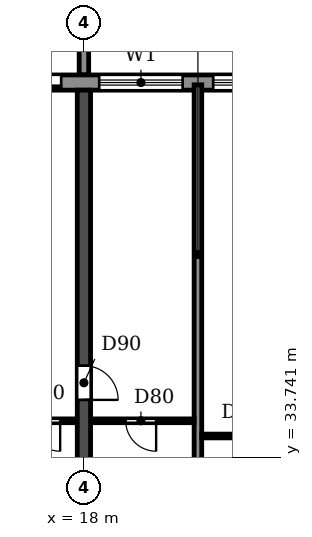
"""IFC4 building model, lengths in metres.
Left out: names, types, materials, properties, quantities, classifications, styles, units other than length and angle.
Written with IfcOpenShell. Run it as: python <this file> out.ifc"""

import sys

from ifc_helpers import new_model, si_unit, direction, frame, frame_2d, origin, place, context, subcontext, project, spatial, polyline, rectangle, outline, extrude, source, transform, mapped, element, fill, save


model = new_model("IFC4")
c1 = context("Model", 3, precision=1e-05, world=origin(), true_north=direction((0.0, 1.0)))
c2 = subcontext(c1, "Body", "Model", "MODEL_VIEW")
j1 = project(units=[si_unit("LENGTHUNIT", "METRE"), si_unit("PLANEANGLEUNIT", "RADIAN")], contexts=[c1])
p1 = place(None, origin())
s1 = spatial("IfcSite", under=j1, at=p1, CompositionType="ELEMENT")
p2 = place(p1, origin())
s2 = spatial("IfcBuilding", under=s1, at=p2, CompositionType="ELEMENT")
p3 = place(p2, frame((0.0, 0.0, 82.8)))
s3 = spatial("IfcBuildingStorey", under=s2, at=p3, CompositionType="ELEMENT", Elevation=82.8)
p4 = place(p3, frame((18.0, 30.525, 0.0), z_axis=(0.0, 0.0, 1.0), x_axis=(0.0, 1.0, 0.0)))
e1 = element("IfcWall", 1, at=p4, inside=s3, PredefinedType="SHEAR", context=c2, shape_type="SweptSolid", body=[
    extrude(rectangle(XDim=12.875, YDim=0.35, at=frame_2d((6.438, 0.0))), origin(), (0.0, 0.0, 1.0), 3.06),
])
p5 = place(p4, frame((4.725, 0.0, 0.0)))
e2 = element("IfcOpeningElement", 2, at=p5, cuts=e1, PredefinedType="OPENING", context=c2, shape_type="SweptSolid", body=[
    extrude(rectangle(XDim=0.9, YDim=2.1, at=frame_2d((0.45, 1.05))), frame((0.0, 0.185, 0.0), z_axis=(0.0, -1.0, 0.0), x_axis=(1.0, 0.0, 0.0)), (0.0, 0.0, 1.0), 0.37),
])
p6 = place(p3, frame((91.317, 43.6, 0.0), z_axis=(0.0, 0.0, 1.0), x_axis=(-1.0, 0.0, 0.0)))
e3 = element("IfcWall", 3, at=p6, inside=s3, PredefinedType="STANDARD", context=c2, shape_type="SweptSolid", body=[
    extrude(rectangle(XDim=80.634, YDim=0.4, at=frame_2d((40.317, 0.0))), origin(), (0.0, 0.0, 1.0), 3.06),
])
p7 = place(p6, frame((76.717, 0.0, 0.9)))
e4 = element("IfcOpeningElement", 4, at=p7, cuts=e3, PredefinedType="OPENING", context=c2, shape_type="SweptSolid", body=[
    extrude(rectangle(XDim=2.2, YDim=1.5, at=frame_2d((1.1, 0.75))), frame((0.0, 0.21, 0.0), z_axis=(0.0, -1.0, 0.0), x_axis=(1.0, 0.0, 0.0)), (0.0, 0.0, 1.0), 0.42),
])
p8 = place(p6, frame((73.917, 0.0, 0.0)))
e5 = element("IfcOpeningElement", 5, at=p8, cuts=e3, PredefinedType="OPENING", context=c2, shape_type="SweptSolid", body=[
    extrude(rectangle(XDim=1.8, YDim=2.4, at=frame_2d((0.9, 1.2))), frame((0.0, 0.21, 0.0), z_axis=(0.0, -1.0, 0.0), x_axis=(1.0, 0.0, 0.0)), (0.0, 0.0, 1.0), 0.42),
])
p9 = place(p6, frame((70.717, 0.0, 0.9)))
e6 = element("IfcOpeningElement", 6, at=p9, cuts=e3, PredefinedType="OPENING", context=c2, shape_type="SweptSolid", body=[
    extrude(rectangle(XDim=2.2, YDim=1.5, at=frame_2d((1.1, 0.75))), frame((0.0, 0.21, 0.0), z_axis=(0.0, -1.0, 0.0), x_axis=(1.0, 0.0, 0.0)), (0.0, 0.0, 1.0), 0.42),
])
p10 = place(p6, frame((67.717, 0.0, 0.9)))
e7 = element("IfcOpeningElement", 7, at=p10, cuts=e3, PredefinedType="OPENING", context=c2, shape_type="SweptSolid", body=[
    extrude(rectangle(XDim=2.2, YDim=1.5, at=frame_2d((1.1, 0.75))), frame((0.0, 0.21, 0.0), z_axis=(0.0, -1.0, 0.0), x_axis=(1.0, 0.0, 0.0)), (0.0, 0.0, 1.0), 0.42),
])
p11 = place(p6, frame((64.717, 0.0, 0.9)))
e8 = element("IfcOpeningElement", 8, at=p11, cuts=e3, PredefinedType="OPENING", context=c2, shape_type="SweptSolid", body=[
    extrude(rectangle(XDim=2.2, YDim=1.5, at=frame_2d((1.1, 0.75))), frame((0.0, 0.21, 0.0), z_axis=(0.0, -1.0, 0.0), x_axis=(1.0, 0.0, 0.0)), (0.0, 0.0, 1.0), 0.42),
])
p12 = place(p6, frame((61.917, 0.0, 0.0)))
e9 = element("IfcOpeningElement", 9, at=p12, cuts=e3, PredefinedType="OPENING", context=c2, shape_type="SweptSolid", body=[
    extrude(rectangle(XDim=1.8, YDim=2.4, at=frame_2d((0.9, 1.2))), frame((0.0, 0.21, 0.0), z_axis=(0.0, -1.0, 0.0), x_axis=(1.0, 0.0, 0.0)), (0.0, 0.0, 1.0), 0.42),
])
p13 = place(p6, frame((58.917, 0.0, 0.0)))
e10 = element("IfcOpeningElement", 10, at=p13, cuts=e3, PredefinedType="OPENING", context=c2, shape_type="SweptSolid", body=[
    extrude(rectangle(XDim=1.8, YDim=2.4, at=frame_2d((0.9, 1.2))), frame((0.0, 0.21, 0.0), z_axis=(0.0, -1.0, 0.0), x_axis=(1.0, 0.0, 0.0)), (0.0, 0.0, 1.0), 0.42),
])
p14 = place(p6, frame((55.717, 0.0, 0.9)))
e11 = element("IfcOpeningElement", 11, at=p14, cuts=e3, PredefinedType="OPENING", context=c2, shape_type="SweptSolid", body=[
    extrude(rectangle(XDim=2.2, YDim=1.5, at=frame_2d((1.1, 0.75))), frame((0.0, 0.21, 0.0), z_axis=(0.0, -1.0, 0.0), x_axis=(1.0, 0.0, 0.0)), (0.0, 0.0, 1.0), 0.42),
])
p15 = place(p6, frame((52.717, 0.0, 0.9)))
e12 = element("IfcOpeningElement", 12, at=p15, cuts=e3, PredefinedType="OPENING", context=c2, shape_type="SweptSolid", body=[
    extrude(rectangle(XDim=2.2, YDim=1.5, at=frame_2d((1.1, 0.75))), frame((0.0, 0.21, 0.0), z_axis=(0.0, -1.0, 0.0), x_axis=(1.0, 0.0, 0.0)), (0.0, 0.0, 1.0), 0.42),
])
p16 = place(p6, frame((49.917, 0.0, 0.0)))
e13 = element("IfcOpeningElement", 13, at=p16, cuts=e3, PredefinedType="OPENING", context=c2, shape_type="SweptSolid", body=[
    extrude(rectangle(XDim=1.8, YDim=2.4, at=frame_2d((0.9, 1.2))), frame((0.0, 0.21, 0.0), z_axis=(0.0, -1.0, 0.0), x_axis=(1.0, 0.0, 0.0)), (0.0, 0.0, 1.0), 0.42),
])
p17 = place(p6, frame((46.717, 0.0, 0.9)))
e14 = element("IfcOpeningElement", 14, at=p17, cuts=e3, PredefinedType="OPENING", context=c2, shape_type="SweptSolid", body=[
    extrude(rectangle(XDim=2.2, YDim=1.5, at=frame_2d((1.1, 0.75))), frame((0.0, 0.21, 0.0), z_axis=(0.0, -1.0, 0.0), x_axis=(1.0, 0.0, 0.0)), (0.0, 0.0, 1.0), 0.42),
])
p18 = place(p6, frame((43.717, 0.0, 0.9)))
e15 = element("IfcOpeningElement", 15, at=p18, cuts=e3, PredefinedType="OPENING", context=c2, shape_type="SweptSolid", body=[
    extrude(rectangle(XDim=2.2, YDim=1.5, at=frame_2d((1.1, 0.75))), frame((0.0, 0.21, 0.0), z_axis=(0.0, -1.0, 0.0), x_axis=(1.0, 0.0, 0.0)), (0.0, 0.0, 1.0), 0.42),
])
p19 = place(p6, frame((40.717, 0.0, 0.9)))
e16 = element("IfcOpeningElement", 16, at=p19, cuts=e3, PredefinedType="OPENING", context=c2, shape_type="SweptSolid", body=[
    extrude(rectangle(XDim=2.2, YDim=1.5, at=frame_2d((1.1, 0.75))), frame((0.0, 0.21, 0.0), z_axis=(0.0, -1.0, 0.0), x_axis=(1.0, 0.0, 0.0)), (0.0, 0.0, 1.0), 0.42),
])
p20 = place(p6, frame((37.917, 0.0, 0.0)))
e17 = element("IfcOpeningElement", 17, at=p20, cuts=e3, PredefinedType="OPENING", context=c2, shape_type="SweptSolid", body=[
    extrude(rectangle(XDim=1.8, YDim=2.4, at=frame_2d((0.9, 1.2))), frame((0.0, 0.21, 0.0), z_axis=(0.0, -1.0, 0.0), x_axis=(1.0, 0.0, 0.0)), (0.0, 0.0, 1.0), 0.42),
])
p21 = place(p6, frame((34.717, 0.0, 0.9)))
e18 = element("IfcOpeningElement", 18, at=p21, cuts=e3, PredefinedType="OPENING", context=c2, shape_type="SweptSolid", body=[
    extrude(rectangle(XDim=2.2, YDim=1.5, at=frame_2d((1.1, 0.75))), frame((0.0, 0.21, 0.0), z_axis=(0.0, -1.0, 0.0), x_axis=(1.0, 0.0, 0.0)), (0.0, 0.0, 1.0), 0.42),
])
p22 = place(p6, frame((31.717, 0.0, 0.9)))
e19 = element("IfcOpeningElement", 19, at=p22, cuts=e3, PredefinedType="OPENING", context=c2, shape_type="SweptSolid", body=[
    extrude(rectangle(XDim=2.2, YDim=1.5, at=frame_2d((1.1, 0.75))), frame((0.0, 0.21, 0.0), z_axis=(0.0, -1.0, 0.0), x_axis=(1.0, 0.0, 0.0)), (0.0, 0.0, 1.0), 0.42),
])
p23 = place(p6, frame((28.917, 0.0, 0.0)))
e20 = element("IfcOpeningElement", 20, at=p23, cuts=e3, PredefinedType="OPENING", context=c2, shape_type="SweptSolid", body=[
    extrude(rectangle(XDim=1.8, YDim=2.4, at=frame_2d((0.9, 1.2))), frame((0.0, 0.21, 0.0), z_axis=(0.0, -1.0, 0.0), x_axis=(1.0, 0.0, 0.0)), (0.0, 0.0, 1.0), 0.42),
])
p24 = place(p6, frame((25.717, 0.0, 0.9)))
e21 = element("IfcOpeningElement", 21, at=p24, cuts=e3, PredefinedType="OPENING", context=c2, shape_type="SweptSolid", body=[
    extrude(rectangle(XDim=2.2, YDim=1.5, at=frame_2d((1.1, 0.75))), frame((0.0, 0.21, 0.0), z_axis=(0.0, -1.0, 0.0), x_axis=(1.0, 0.0, 0.0)), (0.0, 0.0, 1.0), 0.42),
])
p25 = place(p6, frame((22.717, 0.0, 0.9)))
e22 = element("IfcOpeningElement", 22, at=p25, cuts=e3, PredefinedType="OPENING", context=c2, shape_type="SweptSolid", body=[
    extrude(rectangle(XDim=2.2, YDim=1.5, at=frame_2d((1.1, 0.75))), frame((0.0, 0.21, 0.0), z_axis=(0.0, -1.0, 0.0), x_axis=(1.0, 0.0, 0.0)), (0.0, 0.0, 1.0), 0.42),
])
p26 = place(p6, frame((19.717, 0.0, 0.9)))
e23 = element("IfcOpeningElement", 23, at=p26, cuts=e3, PredefinedType="OPENING", context=c2, shape_type="SweptSolid", body=[
    extrude(rectangle(XDim=2.2, YDim=1.5, at=frame_2d((1.1, 0.75))), frame((0.0, 0.21, 0.0), z_axis=(0.0, -1.0, 0.0), x_axis=(1.0, 0.0, 0.0)), (0.0, 0.0, 1.0), 0.42),
])
p27 = place(p6, frame((16.717, 0.0, 0.9)))
e24 = element("IfcOpeningElement", 24, at=p27, cuts=e3, PredefinedType="OPENING", context=c2, shape_type="SweptSolid", body=[
    extrude(rectangle(XDim=2.2, YDim=1.5, at=frame_2d((1.1, 0.75))), frame((0.0, 0.21, 0.0), z_axis=(0.0, -1.0, 0.0), x_axis=(1.0, 0.0, 0.0)), (0.0, 0.0, 1.0), 0.42),
])
p28 = place(p6, frame((13.917, 0.0, 0.0)))
e25 = element("IfcOpeningElement", 25, at=p28, cuts=e3, PredefinedType="OPENING", context=c2, shape_type="SweptSolid", body=[
    extrude(rectangle(XDim=1.8, YDim=2.4, at=frame_2d((0.9, 1.2))), frame((0.0, 0.21, 0.0), z_axis=(0.0, -1.0, 0.0), x_axis=(1.0, 0.0, 0.0)), (0.0, 0.0, 1.0), 0.42),
])
p29 = place(p6, frame((10.717, 0.0, 0.9)))
e26 = element("IfcOpeningElement", 26, at=p29, cuts=e3, PredefinedType="OPENING", context=c2, shape_type="SweptSolid", body=[
    extrude(rectangle(XDim=2.2, YDim=1.5, at=frame_2d((1.1, 0.75))), frame((0.0, 0.21, 0.0), z_axis=(0.0, -1.0, 0.0), x_axis=(1.0, 0.0, 0.0)), (0.0, 0.0, 1.0), 0.42),
])
p30 = place(p6, frame((7.717, 0.0, 0.9)))
e27 = element("IfcOpeningElement", 27, at=p30, cuts=e3, PredefinedType="OPENING", context=c2, shape_type="SweptSolid", body=[
    extrude(rectangle(XDim=2.2, YDim=1.5, at=frame_2d((1.1, 0.75))), frame((0.0, 0.21, 0.0), z_axis=(0.0, -1.0, 0.0), x_axis=(1.0, 0.0, 0.0)), (0.0, 0.0, 1.0), 0.42),
])
p31 = place(p6, frame((4.917, 0.0, 0.0)))
e28 = element("IfcOpeningElement", 28, at=p31, cuts=e3, PredefinedType="OPENING", context=c2, shape_type="SweptSolid", body=[
    extrude(rectangle(XDim=1.8, YDim=2.4, at=frame_2d((0.9, 1.2))), frame((0.0, 0.21, 0.0), z_axis=(0.0, -1.0, 0.0), x_axis=(1.0, 0.0, 0.0)), (0.0, 0.0, 1.0), 0.42),
])
p32 = place(p6, frame((1.717, 0.0, 0.9)))
e29 = element("IfcOpeningElement", 29, at=p32, cuts=e3, PredefinedType="OPENING", context=c2, shape_type="SweptSolid", body=[
    extrude(rectangle(XDim=2.2, YDim=1.5, at=frame_2d((1.1, 0.75))), frame((0.0, 0.21, 0.0), z_axis=(0.0, -1.0, 0.0), x_axis=(1.0, 0.0, 0.0)), (0.0, 0.0, 1.0), 0.42),
])
m1 = source(origin(), c2, "Body", "SweptSolid", [
    extrude(outline(polyline([(0.0, 0.0), (0.25, 0.0), (0.25, 3.1), (0.0, 3.1), (0.0, 0.0)])), origin(), (0.0, 0.0, 1.0), 3.1),
])
p33 = place(p3, frame((17.875, 43.8, 0.0)))
e30 = element("IfcWall", 30, at=p33, inside=s3, PredefinedType="STANDARD", context=c2, shape_type="MappedRepresentation", body=[
    mapped(m1, transform((0.0, 0.0, 0.0))),
])
p34 = place(p3, frame((21.0, 30.535, 0.0), z_axis=(0.0, 0.0, 1.0), x_axis=(0.0, 1.0, 0.0)))
e31 = element("IfcWall", 31, at=p34, inside=s3, PredefinedType="PARTITIONING", context=c2, shape_type="SweptSolid", body=[
    extrude(rectangle(XDim=13.005, YDim=0.2, at=frame_2d((6.502, 0.0))), origin(), (0.0, 0.0, 1.0), 3.06),
])
p35 = place(p3, frame((21.1, 34.3, 0.0), z_axis=(0.0, 0.0, 1.0), x_axis=(1.0, 0.0, 0.0)))
e32 = element("IfcWall", 32, at=p35, inside=s3, PredefinedType="PARTITIONING", context=c2, shape_type="SweptSolid", body=[
    extrude(rectangle(XDim=2.715, YDim=0.1, at=frame_2d((1.357, 0.0))), origin(), (0.0, 0.0, 1.0), 3.06),
])
p36 = place(p35, frame((1.0, 0.0, 0.0)))
e33 = element("IfcOpeningElement", 33, at=p36, cuts=e32, PredefinedType="OPENING", context=c2, shape_type="SweptSolid", body=[
    extrude(rectangle(XDim=0.8, YDim=2.1, at=frame_2d((0.4, 1.05))), frame((0.0, 0.06, 0.0), z_axis=(0.0, -1.0, 0.0), x_axis=(1.0, 0.0, 0.0)), (0.0, 0.0, 1.0), 0.12),
])
p37 = place(p3, frame((15.9, 34.7, 0.0), z_axis=(0.0, 0.0, 1.0), x_axis=(1.0, 0.0, 0.0)))
e34 = element("IfcWall", 34, at=p37, inside=s3, PredefinedType="PARTITIONING", context=c2, shape_type="SweptSolid", body=[
    extrude(rectangle(XDim=1.915, YDim=0.1, at=frame_2d((0.958, 0.0))), origin(), (0.0, 0.0, 1.0), 3.06),
])
p38 = place(p37, frame((0.675, 0.0, 0.0)))
e35 = element("IfcOpeningElement", 35, at=p38, cuts=e34, PredefinedType="OPENING", context=c2, shape_type="SweptSolid", body=[
    extrude(rectangle(XDim=0.8, YDim=2.1, at=frame_2d((0.4, 1.05))), frame((0.0, 0.06, 0.0), z_axis=(0.0, -1.0, 0.0), x_axis=(1.0, 0.0, 0.0)), (0.0, 0.0, 1.0), 0.12),
])
p39 = place(p3, frame((18.185, 34.7, 0.0), z_axis=(0.0, 0.0, 1.0), x_axis=(1.0, 0.0, 0.0)))
e36 = element("IfcWall", 36, at=p39, inside=s3, PredefinedType="PARTITIONING", context=c2, shape_type="SweptSolid", body=[
    extrude(rectangle(XDim=2.715, YDim=0.1, at=frame_2d((1.357, 0.0))), origin(), (0.0, 0.0, 1.0), 3.06),
])
p40 = place(p39, frame((0.915, 0.0, 0.0)))
e37 = element("IfcOpeningElement", 37, at=p40, cuts=e36, PredefinedType="OPENING", context=c2, shape_type="SweptSolid", body=[
    extrude(rectangle(XDim=0.8, YDim=2.1, at=frame_2d((0.4, 1.05))), frame((0.0, 0.06, 0.0), z_axis=(0.0, -1.0, 0.0), x_axis=(1.0, 0.0, 0.0)), (0.0, 0.0, 1.0), 0.12),
])
p41 = place(p8, origin())
e38 = element("IfcDoor", 38, at=p41, inside=s3, OperationType="DOUBLE_DOOR_SLIDING", PredefinedType="DOOR", context=c2, shape_type="SweptSolid", body=[
    extrude(rectangle(XDim=1.8, YDim=2.4, at=frame_2d((0.9, 1.2))), frame((0.0, 0.025, 0.0), z_axis=(0.0, -1.0, 0.0), x_axis=(1.0, 0.0, 0.0)), (0.0, 0.0, 1.0), 0.05),
])
fill(e5, e38)
p42 = place(p9, origin())
e39 = element("IfcWindow", 39, at=p42, inside=s3, PartitioningType="DOUBLE_PANEL_HORIZONTAL", PredefinedType="WINDOW", context=c2, shape_type="SweptSolid", body=[
    extrude(rectangle(XDim=2.2, YDim=1.5, at=frame_2d((1.1, 0.75))), frame((0.0, 0.03, 0.0), z_axis=(0.0, -1.0, 0.0), x_axis=(1.0, 0.0, 0.0)), (0.0, 0.0, 1.0), 0.06),
])
fill(e6, e39)
p43 = place(p10, origin())
e40 = element("IfcWindow", 40, at=p43, inside=s3, PartitioningType="DOUBLE_PANEL_HORIZONTAL", PredefinedType="WINDOW", context=c2, shape_type="SweptSolid", body=[
    extrude(rectangle(XDim=2.2, YDim=1.5, at=frame_2d((1.1, 0.75))), frame((0.0, 0.03, 0.0), z_axis=(0.0, -1.0, 0.0), x_axis=(1.0, 0.0, 0.0)), (0.0, 0.0, 1.0), 0.06),
])
fill(e7, e40)
p44 = place(p40, frame((0.8, 0.0, 0.0), z_axis=(0.0, 0.0, 1.0), x_axis=(-1.0, 0.0, 0.0)))
e41 = element("IfcDoor", 41, at=p44, inside=s3, OperationType="SINGLE_SWING_LEFT", PredefinedType="DOOR", context=c2, shape_type="SweptSolid", body=[
    extrude(rectangle(XDim=0.8, YDim=2.1, at=frame_2d((0.4, 1.05))), frame((0.0, 0.025, 0.0), z_axis=(0.0, -1.0, 0.0), x_axis=(1.0, 0.0, 0.0)), (0.0, 0.0, 1.0), 0.05),
])
fill(e37, e41)
p45 = place(p38, frame((0.8, 0.0, 0.0), z_axis=(0.0, 0.0, 1.0), x_axis=(-1.0, 0.0, 0.0)))
e42 = element("IfcDoor", 42, at=p45, inside=s3, OperationType="SINGLE_SWING_LEFT", PredefinedType="DOOR", context=c2, shape_type="SweptSolid", body=[
    extrude(rectangle(XDim=0.8, YDim=2.1, at=frame_2d((0.4, 1.05))), frame((0.0, 0.025, 0.0), z_axis=(0.0, -1.0, 0.0), x_axis=(1.0, 0.0, 0.0)), (0.0, 0.0, 1.0), 0.05),
])
fill(e35, e42)
p46 = place(p5, frame((0.9, 0.0, 0.0), z_axis=(0.0, 0.0, 1.0), x_axis=(-1.0, 0.0, 0.0)))
e43 = element("IfcDoor", 43, at=p46, inside=s3, OperationType="SINGLE_SWING_RIGHT", PredefinedType="DOOR", context=c2, shape_type="SweptSolid", body=[
    extrude(rectangle(XDim=0.9, YDim=2.1, at=frame_2d((0.45, 1.05))), frame((0.0, 0.025, 0.0), z_axis=(0.0, -1.0, 0.0), x_axis=(1.0, 0.0, 0.0)), (0.0, 0.0, 1.0), 0.05),
])
fill(e2, e43)
save(model, sys.argv[1])
